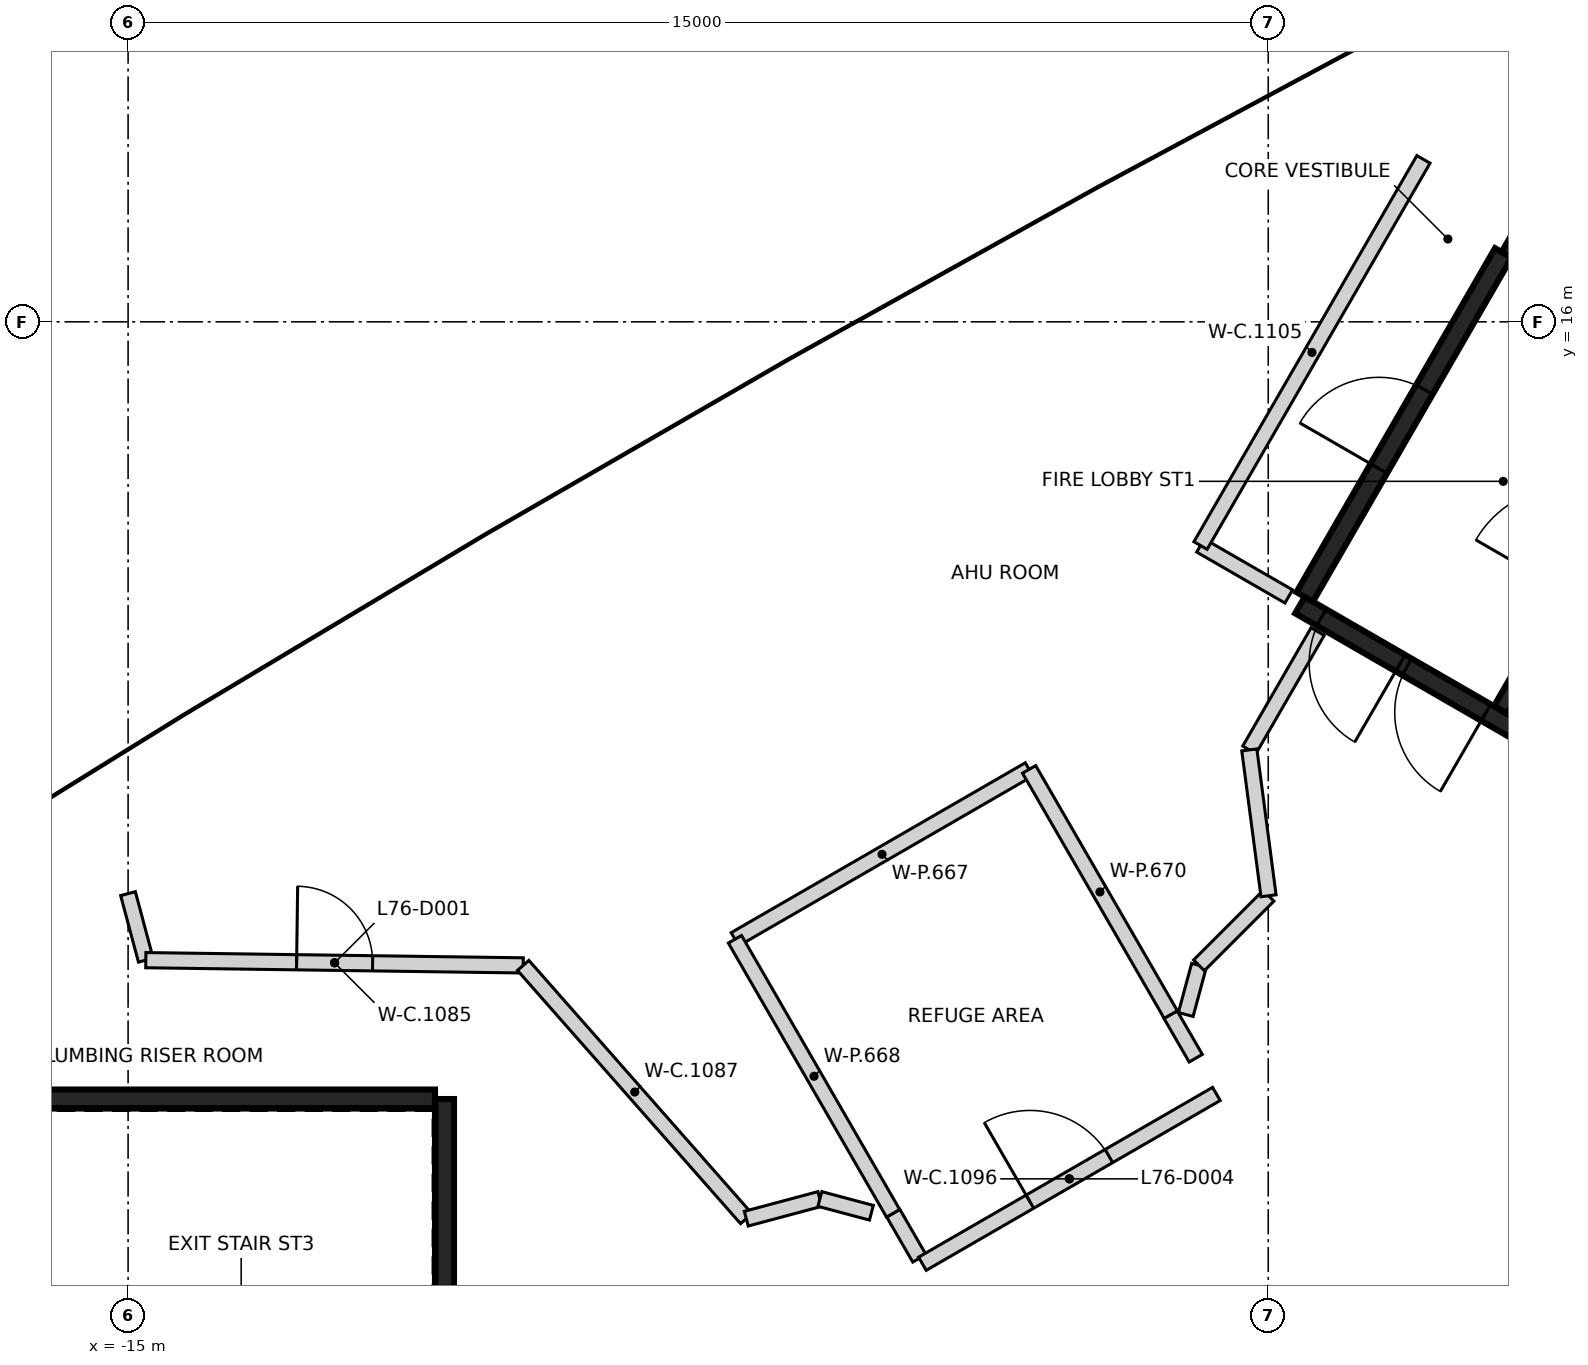
"""IFC4 building model, lengths in metres.
Left out: names, types, materials, properties, quantities, classifications, styles, units other than length and angle.
Written with IfcOpenShell. Run it as: python <this file> out.ifc"""

import sys

from ifc_helpers import new_model, si_unit, direction, frame, frame_2d, origin, place, context, subcontext, project, spatial, rectangle, extrude, element, fill, save


model = new_model("IFC4")
c1 = context("Model", 3, precision=1e-05, world=origin(), true_north=direction((0.0, 1.0)))
c2 = subcontext(c1, "Body", "Model", "MODEL_VIEW")
j1 = project(units=[si_unit("LENGTHUNIT", "METRE"), si_unit("PLANEANGLEUNIT", "RADIAN")], contexts=[c1])
p1 = place(None, origin())
s1 = spatial("IfcSite", under=j1, at=p1, CompositionType="ELEMENT")
p2 = place(p1, origin())
s2 = spatial("IfcBuilding", under=s1, at=p2, CompositionType="ELEMENT")
p3 = place(p2, frame((0.0, 0.0, 301.8)))
s3 = spatial("IfcBuildingStorey", under=s2, at=p3, CompositionType="ELEMENT", Elevation=301.8)
p4 = place(p3, frame((-10.837, 5.775, 0.0), z_axis=(0.0, 0.0, 1.0), x_axis=(0.0, -1.0, 0.0)))
e1 = element("IfcWall", 1, at=p4, inside=s3, PredefinedType="SHEAR", context=c2, shape_type="SweptSolid", body=[
    extrude(rectangle(XDim=11.55, YDim=0.25, at=frame_2d((5.775, 0.0))), origin(), (0.0, 0.0, 1.0), 4.45),
])
p5 = place(p4, frame((10.025, 0.0, 0.0)))
e2 = element("IfcOpeningElement", 2, at=p5, cuts=e1, PredefinedType="OPENING", context=c2, shape_type="SweptSolid", body=[
    extrude(rectangle(XDim=1.2, YDim=2.1, at=frame_2d((0.6, 1.05))), frame((0.0, 0.135, 0.0), z_axis=(0.0, -1.0, 0.0), x_axis=(1.0, 0.0, 0.0)), (0.0, 0.0, 1.0), 0.27),
])
p6 = place(p4, frame((8.725, 0.0, 0.0)))
e3 = element("IfcOpeningElement", 3, at=p6, cuts=e1, PredefinedType="OPENING", context=c2, shape_type="SweptSolid", body=[
    extrude(rectangle(XDim=1.2, YDim=2.1, at=frame_2d((0.6, 1.05))), frame((0.0, 0.135, 0.0), z_axis=(0.0, -1.0, 0.0), x_axis=(1.0, 0.0, 0.0)), (0.0, 0.0, 1.0), 0.27),
])
p7 = place(p3, frame((-16.472, 5.775, 0.0), z_axis=(0.0, 0.0, 1.0), x_axis=(1.0, 0.0, 0.0)))
e4 = element("IfcWall", 4, at=p7, inside=s3, PredefinedType="SHEAR", context=c2, shape_type="SweptSolid", body=[
    extrude(rectangle(XDim=5.51, YDim=0.25, at=frame_2d((2.755, 0.0))), origin(), (0.0, 0.0, 1.0), 4.45),
])
p8 = place(p3, frame((10.42, 6.498, 0.0), z_axis=(0.0, 0.0, 1.0), x_axis=(-0.866021906294, 0.500006057782, 0.0)))
e5 = element("IfcWall", 5, at=p8, inside=s3, PredefinedType="SHEAR", context=c2, shape_type="SweptSolid", body=[
    extrude(rectangle(XDim=11.55, YDim=0.25, at=frame_2d((5.775, 0.0))), origin(), (0.0, 0.0, 1.0), 4.45),
])
p9 = place(p8, frame((10.025, 0.0, 0.0)))
e6 = element("IfcOpeningElement", 6, at=p9, cuts=e5, PredefinedType="OPENING", context=c2, shape_type="SweptSolid", body=[
    extrude(rectangle(XDim=1.2, YDim=2.1, at=frame_2d((0.6, 1.05))), frame((0.0, 0.135, 0.0), z_axis=(0.0, -1.0, 0.0), x_axis=(1.0, 0.0, 0.0)), (0.0, 0.0, 1.0), 0.27),
])
p10 = place(p8, frame((8.725, 0.0, 0.0)))
e7 = element("IfcOpeningElement", 7, at=p10, cuts=e5, PredefinedType="OPENING", context=c2, shape_type="SweptSolid", body=[
    extrude(rectangle(XDim=1.2, YDim=2.1, at=frame_2d((0.6, 1.05))), frame((0.0, 0.135, 0.0), z_axis=(0.0, -1.0, 0.0), x_axis=(1.0, 0.0, 0.0)), (0.0, 0.0, 1.0), 0.27),
])
p11 = place(p3, frame((3.179, 16.856, 0.0), z_axis=(0.0, 0.0, 1.0), x_axis=(0.500001955336, 0.866024274868, 0.0)))
e8 = element("IfcWall", 8, at=p11, inside=s3, PredefinedType="SHEAR", context=c2, shape_type="SweptSolid", body=[
    extrude(rectangle(XDim=6.125, YDim=0.25, at=frame_2d((3.062, 0.0))), origin(), (0.0, 0.0, 1.0), 4.45),
])
p12 = place(p11, frame((4.563, 0.0, 0.0)))
e9 = element("IfcOpeningElement", 9, at=p12, cuts=e8, PredefinedType="OPENING", context=c2, shape_type="SweptSolid", body=[
    extrude(rectangle(XDim=1.0, YDim=2.1, at=frame_2d((0.5, 1.05))), frame((0.0, 0.135, 0.0), z_axis=(0.0, -1.0, 0.0), x_axis=(1.0, 0.0, 0.0)), (0.0, 0.0, 1.0), 0.27),
])
p13 = place(p3, frame((0.48, 12.381, 0.0), z_axis=(0.0, 0.0, 1.0), x_axis=(0.49999885962, 0.866026062182, 0.0)))
e10 = element("IfcWall", 10, at=p13, inside=s3, PredefinedType="SHEAR", context=c2, shape_type="SweptSolid", body=[
    extrude(rectangle(XDim=5.225, YDim=0.25, at=frame_2d((2.612, 0.0))), origin(), (0.0, 0.0, 1.0), 4.45),
])
p14 = place(p13, frame((1.95, 0.0, 0.0)))
e11 = element("IfcOpeningElement", 11, at=p14, cuts=e10, PredefinedType="OPENING", context=c2, shape_type="SweptSolid", body=[
    extrude(rectangle(XDim=1.2, YDim=2.1, at=frame_2d((0.6, 1.05))), frame((0.0, 0.135, 0.0), z_axis=(0.0, -1.0, 0.0), x_axis=(1.0, 0.0, 0.0)), (0.0, 0.0, 1.0), 0.27),
])
p15 = place(p3, frame((3.057, 10.895, 0.0), z_axis=(0.0, 0.0, 1.0), x_axis=(0.500027839223, 0.866009330205, 0.0)))
e12 = element("IfcWall", 12, at=p15, inside=s3, PredefinedType="SHEAR", context=c2, shape_type="SweptSolid", body=[
    extrude(rectangle(XDim=5.098, YDim=0.2, at=frame_2d((2.549, 0.0))), origin(), (0.0, 0.0, 1.0), 4.45),
])
p16 = place(p15, frame((1.774, 0.0, 0.0)))
e13 = element("IfcOpeningElement", 13, at=p16, cuts=e12, PredefinedType="OPENING", context=c2, shape_type="SweptSolid", body=[
    extrude(rectangle(XDim=1.4, YDim=2.1, at=frame_2d((0.7, 1.05))), frame((0.0, 0.11, 0.0), z_axis=(0.0, -1.0, 0.0), x_axis=(1.0, 0.0, 0.0)), (0.0, 0.0, 1.0), 0.22),
])
p17 = place(p3, frame((-15.001, 8.477, 0.0), z_axis=(0.0, 0.0, 1.0), x_axis=(0.258233031799, -0.966082657586, 0.0)))
e14 = element("IfcWall", 14, at=p17, inside=s3, PredefinedType="PARTITIONING", context=c2, shape_type="SweptSolid", body=[
    extrude(rectangle(XDim=0.906, YDim=0.2, at=frame_2d((0.453, 0.0))), origin(), (0.0, 0.0, 1.0), 4.45),
])
p18 = place(p3, frame((-14.767, 7.602, 0.0), z_axis=(0.0, 0.0, 1.0), x_axis=(0.999903193163, -0.013914176312, 0.0)))
e15 = element("IfcWall", 15, at=p18, inside=s3, PredefinedType="PARTITIONING", context=c2, shape_type="SweptSolid", body=[
    extrude(rectangle(XDim=4.966, YDim=0.2, at=frame_2d((2.483, 0.0))), origin(), (0.0, 0.0, 1.0), 4.45),
])
p19 = place(p18, frame((1.984, 0.0, 0.0)))
e16 = element("IfcOpeningElement", 16, at=p19, cuts=e15, PredefinedType="OPENING", context=c2, shape_type="SweptSolid", body=[
    extrude(rectangle(XDim=1.0, YDim=2.1, at=frame_2d((0.5, 1.05))), frame((0.0, 0.11, 0.0), z_axis=(0.0, -1.0, 0.0), x_axis=(1.0, 0.0, 0.0)), (0.0, 0.0, 1.0), 0.22),
])
p20 = place(p3, frame((-9.802, 7.533, 0.0), z_axis=(0.0, 0.0, 1.0), x_axis=(0.660992214586, -0.750392758665, 0.0)))
e17 = element("IfcWall", 17, at=p20, inside=s3, PredefinedType="PARTITIONING", context=c2, shape_type="SweptSolid", body=[
    extrude(rectangle(XDim=4.44, YDim=0.2, at=frame_2d((2.22, 0.0))), origin(), (0.0, 0.0, 1.0), 4.45),
])
p21 = place(p3, frame((-6.867, 4.201, 0.0), z_axis=(0.0, 0.0, 1.0), x_axis=(0.966012174397, 0.258496574284, 0.0)))
e18 = element("IfcWall", 18, at=p21, inside=s3, PredefinedType="PARTITIONING", context=c2, shape_type="SweptSolid", body=[
    extrude(rectangle(XDim=1.002, YDim=0.2, at=frame_2d((0.501, 0.0))), origin(), (0.0, 0.0, 1.0), 4.45),
])
p22 = place(p3, frame((-5.899, 4.46, 0.0), z_axis=(0.0, 0.0, 1.0), x_axis=(0.966194504605, -0.257814234034, 0.0)))
e19 = element("IfcWall", 19, at=p22, inside=s3, PredefinedType="PARTITIONING", context=c2, shape_type="SweptSolid", body=[
    extrude(rectangle(XDim=0.702, YDim=0.2, at=frame_2d((0.351, 0.0))), origin(), (0.0, 0.0, 1.0), 4.45),
])
p23 = place(p3, frame((-4.933, 4.273, 0.0), z_axis=(0.0, 0.0, 1.0), x_axis=(0.500699086314, -0.865621409719, 0.0)))
e20 = element("IfcWall", 20, at=p23, inside=s3, PredefinedType="PARTITIONING", context=c2, shape_type="SweptSolid", body=[
    extrude(rectangle(XDim=0.685, YDim=0.2, at=frame_2d((0.343, 0.0))), origin(), (0.0, 0.0, 1.0), 4.45),
])
p24 = place(p3, frame((-4.55, 3.608, 0.0), z_axis=(0.0, 0.0, 1.0), x_axis=(0.865943452446, 0.500141917025, 0.0)))
e21 = element("IfcWall", 21, at=p24, inside=s3, PredefinedType="PARTITIONING", context=c2, shape_type="SweptSolid", body=[
    extrude(rectangle(XDim=4.467, YDim=0.2, at=frame_2d((2.233, 0.0))), origin(), (0.0, 0.0, 1.0), 4.45),
])
p25 = place(p24, frame((1.634, 0.0, 0.0)))
e22 = element("IfcOpeningElement", 22, at=p25, cuts=e21, PredefinedType="OPENING", context=c2, shape_type="SweptSolid", body=[
    extrude(rectangle(XDim=1.2, YDim=2.1, at=frame_2d((0.6, 1.05))), frame((0.0, 0.11, 0.0), z_axis=(0.0, -1.0, 0.0), x_axis=(1.0, 0.0, 0.0)), (0.0, 0.0, 1.0), 0.22),
])
p26 = place(p3, frame((-1.285, 6.885, 0.0), z_axis=(0.0, 0.0, 1.0), x_axis=(0.499988630717, -0.866031967744, 0.0)))
e23 = element("IfcWall", 23, at=p26, inside=s3, PredefinedType="PARTITIONING", context=c2, shape_type="SweptSolid", body=[
    extrude(rectangle(XDim=0.662, YDim=0.2, at=frame_2d((0.331, 0.0))), origin(), (0.0, 0.0, 1.0), 4.45),
])
p27 = place(p3, frame((-1.085, 6.887, 0.0), z_axis=(0.0, 0.0, 1.0), x_axis=(0.259816652695, 0.965657965836, 0.0)))
e24 = element("IfcWall", 24, at=p27, inside=s3, PredefinedType="PARTITIONING", context=c2, shape_type="SweptSolid", body=[
    extrude(rectangle(XDim=0.67, YDim=0.2, at=frame_2d((0.335, 0.0))), origin(), (0.0, 0.0, 1.0), 4.45),
])
p28 = place(p3, frame((-0.911, 7.534, 0.0), z_axis=(0.0, 0.0, 1.0), x_axis=(0.707012431094, 0.707201118692, 0.0)))
e25 = element("IfcWall", 25, at=p28, inside=s3, PredefinedType="PARTITIONING", context=c2, shape_type="SweptSolid", body=[
    extrude(rectangle(XDim=1.294, YDim=0.2, at=frame_2d((0.647, 0.0))), origin(), (0.0, 0.0, 1.0), 4.45),
])
p29 = place(p3, frame((-0.891, 13.057, 0.0), z_axis=(0.0, 0.0, 1.0), x_axis=(0.866206814563, -0.499685655593, 0.0)))
e26 = element("IfcWall", 26, at=p29, inside=s3, PredefinedType="PARTITIONING", context=c2, shape_type="SweptSolid", body=[
    extrude(rectangle(XDim=1.34, YDim=0.2, at=frame_2d((0.67, 0.0))), origin(), (0.0, 0.0, 1.0), 4.45),
])
p30 = place(p3, frame((-0.891, 13.057, 0.0), z_axis=(0.0, 0.0, 1.0), x_axis=(0.499997448251, 0.866026877032, 0.0)))
e27 = element("IfcWall", 27, at=p30, inside=s3, PredefinedType="PARTITIONING", context=c2, shape_type="SweptSolid", body=[
    extrude(rectangle(XDim=5.866, YDim=0.2, at=frame_2d((2.933, 0.0))), origin(), (0.0, 0.0, 1.0), 4.45),
])
p31 = place(p3, frame((-0.249, 10.368, 0.0), z_axis=(0.0, 0.0, 1.0), x_axis=(0.499965372359, 0.866045395139, 0.0)))
e28 = element("IfcWall", 28, at=p31, inside=s3, PredefinedType="PARTITIONING", context=c2, shape_type="SweptSolid", body=[
    extrude(rectangle(XDim=1.798, YDim=0.2, at=frame_2d((0.899, 0.0))), origin(), (0.0, 0.0, 1.0), 4.45),
])
p32 = place(p3, frame((-0.249, 10.368, 0.0), z_axis=(0.0, 0.0, 1.0), x_axis=(0.13067638415, -0.991425076658, 0.0)))
e29 = element("IfcWall", 29, at=p32, inside=s3, PredefinedType="PARTITIONING", context=c2, shape_type="SweptSolid", body=[
    extrude(rectangle(XDim=1.936, YDim=0.2, at=frame_2d((0.968, 0.0))), origin(), (0.0, 0.0, 1.0), 4.45),
])
p33 = place(p3, frame((-7.016, 7.877, 0.0), z_axis=(0.0, 0.0, 1.0), x_axis=(0.865958133649, 0.500116497196, 0.0)))
e30 = element("IfcWall", 30, at=p33, inside=s3, PredefinedType="PARTITIONING", context=c2, shape_type="SweptSolid", body=[
    extrude(rectangle(XDim=4.469, YDim=0.2, at=frame_2d((2.235, 0.0))), origin(), (0.0, 0.0, 1.0), 4.45),
])
p34 = place(p3, frame((-7.016, 7.877, 0.0), z_axis=(0.0, 0.0, 1.0), x_axis=(0.499810457605, -0.866134808485, 0.0)))
e31 = element("IfcWall", 31, at=p34, inside=s3, PredefinedType="PARTITIONING", context=c2, shape_type="SweptSolid", body=[
    extrude(rectangle(XDim=4.163, YDim=0.2, at=frame_2d((2.081, 0.0))), origin(), (0.0, 0.0, 1.0), 4.45),
])
p35 = place(p3, frame((-3.146, 10.112, 0.0), z_axis=(0.0, 0.0, 1.0), x_axis=(0.500248116606, -0.865882106197, 0.0)))
e32 = element("IfcWall", 32, at=p35, inside=s3, PredefinedType="PARTITIONING", context=c2, shape_type="SweptSolid", body=[
    extrude(rectangle(XDim=3.725, YDim=0.2, at=frame_2d((1.863, 0.0))), origin(), (0.0, 0.0, 1.0), 4.45),
])
p36 = place(p9, origin())
e33 = element("IfcDoor", 33, at=p36, inside=s3, OperationType="SINGLE_SWING_LEFT", PredefinedType="DOOR", context=c2, shape_type="SweptSolid", body=[
    extrude(rectangle(XDim=1.2, YDim=2.1, at=frame_2d((0.6, 1.05))), frame((0.0, 0.025, 0.0), z_axis=(0.0, -1.0, 0.0), x_axis=(1.0, 0.0, 0.0)), (0.0, 0.0, 1.0), 0.05),
])
fill(e6, e33)
p37 = place(p10, origin())
e34 = element("IfcDoor", 34, at=p37, inside=s3, OperationType="SINGLE_SWING_RIGHT", PredefinedType="DOOR", context=c2, shape_type="SweptSolid", body=[
    extrude(rectangle(XDim=1.2, YDim=2.1, at=frame_2d((0.6, 1.05))), frame((0.0, 0.025, 0.0), z_axis=(0.0, -1.0, 0.0), x_axis=(1.0, 0.0, 0.0)), (0.0, 0.0, 1.0), 0.05),
])
fill(e7, e34)
p38 = place(p14, origin())
e35 = element("IfcDoor", 35, at=p38, inside=s3, OperationType="SINGLE_SWING_LEFT", PredefinedType="DOOR", context=c2, shape_type="SweptSolid", body=[
    extrude(rectangle(XDim=1.2, YDim=2.1, at=frame_2d((0.6, 1.05))), frame((0.0, 0.025, 0.0), z_axis=(0.0, -1.0, 0.0), x_axis=(1.0, 0.0, 0.0)), (0.0, 0.0, 1.0), 0.05),
])
fill(e11, e35)
p39 = place(p19, origin())
e36 = element("IfcDoor", 36, at=p39, inside=s3, OperationType="SINGLE_SWING_LEFT", PredefinedType="DOOR", context=c2, shape_type="SweptSolid", body=[
    extrude(rectangle(XDim=1.0, YDim=2.1, at=frame_2d((0.5, 1.05))), frame((0.0, 0.025, 0.0), z_axis=(0.0, -1.0, 0.0), x_axis=(1.0, 0.0, 0.0)), (0.0, 0.0, 1.0), 0.05),
])
fill(e16, e36)
p40 = place(p25, origin())
e37 = element("IfcDoor", 37, at=p40, inside=s3, OperationType="SINGLE_SWING_LEFT", PredefinedType="DOOR", context=c2, shape_type="SweptSolid", body=[
    extrude(rectangle(XDim=1.2, YDim=2.1, at=frame_2d((0.6, 1.05))), frame((0.0, 0.025, 0.0), z_axis=(0.0, -1.0, 0.0), x_axis=(1.0, 0.0, 0.0)), (0.0, 0.0, 1.0), 0.05),
])
fill(e22, e37)
save(model, sys.argv[1])
